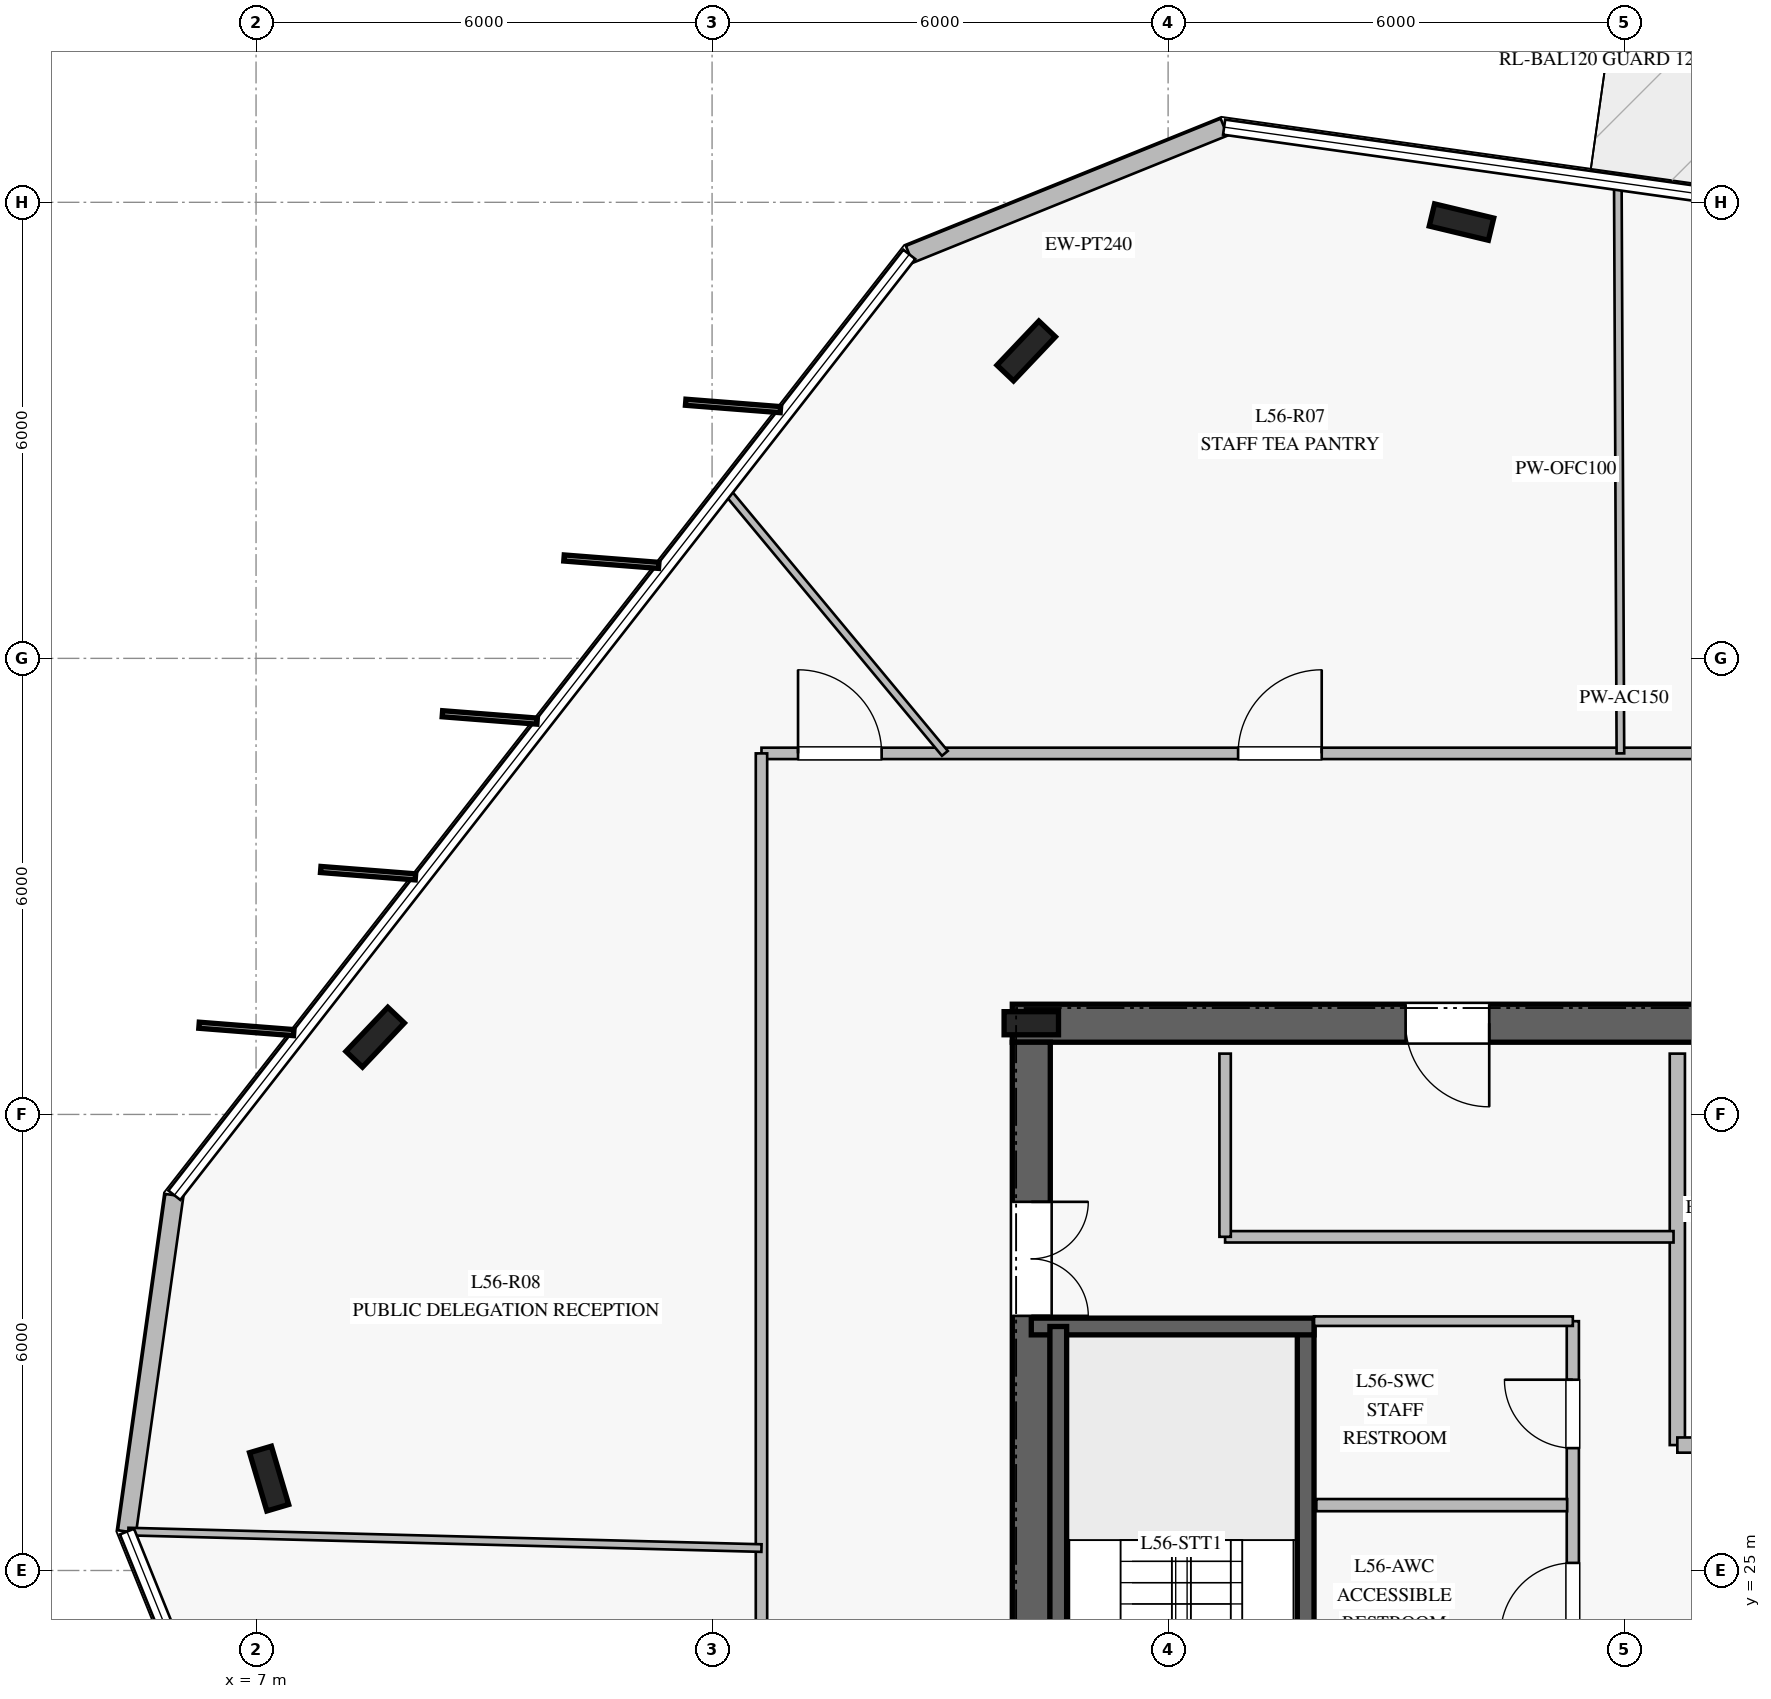
"""IFC4 building model, lengths in metres.
Left out: names, types, materials, properties, quantities, classifications, styles, units other than length and angle.
Written with IfcOpenShell. Run it as: python <this file> out.ifc"""

import sys

from ifc_helpers import new_model, si_unit, direction, frame, frame_2d, origin, origin_2d, place, context, subcontext, project, spatial, rectangle, i_section, extrude, element, fill, save


model = new_model("IFC4")
c1 = context("Model", 3, precision=1e-05, world=origin(), true_north=direction((0.0, 1.0)))
c2 = subcontext(c1, "Body", "Model", "MODEL_VIEW")
j1 = project(units=[si_unit("LENGTHUNIT", "METRE"), si_unit("PLANEANGLEUNIT", "RADIAN")], contexts=[c1])
p1 = place(None, origin())
s1 = spatial("IfcSite", under=j1, at=p1, CompositionType="ELEMENT")
p2 = place(p1, origin())
s2 = spatial("IfcBuilding", under=s1, at=p2, CompositionType="ELEMENT")
p3 = place(p2, frame((0.0, 0.0, 232.8)))
s3 = spatial("IfcBuildingStorey", under=s2, at=p3, CompositionType="ELEMENT", Elevation=232.8)
p4 = place(p3, frame((33.05, 32.2, 0.0), z_axis=(0.0, 0.0, 1.0), x_axis=(-1.0, 0.0, 0.0)))
e1 = element("IfcWall", 1, at=p4, inside=s3, PredefinedType="SHEAR", context=c2, shape_type="SweptSolid", body=[
    extrude(rectangle(XDim=16.1, YDim=0.5, at=frame_2d((8.05, 0.0))), origin(), (0.0, 0.0, 1.0), 3.78),
])
p5 = place(p4, frame((5.0, 0.0, 0.0)))
e2 = element("IfcOpeningElement", 2, at=p5, cuts=e1, PredefinedType="OPENING", context=c2, shape_type="SweptSolid", body=[
    extrude(rectangle(XDim=1.2, YDim=2.25, at=frame_2d((0.6, 1.125))), frame((0.0, 0.26, 0.0), z_axis=(0.0, -1.0, 0.0), x_axis=(1.0, 0.0, 0.0)), (0.0, 0.0, 1.0), 0.52),
])
p6 = place(p4, frame((9.825, 0.0, 0.0)))
e3 = element("IfcOpeningElement", 3, at=p6, cuts=e1, PredefinedType="OPENING", context=c2, shape_type="SweptSolid", body=[
    extrude(rectangle(XDim=1.1, YDim=2.2, at=frame_2d((0.55, 1.1))), frame((0.0, 0.26, 0.0), z_axis=(0.0, -1.0, 0.0), x_axis=(1.0, 0.0, 0.0)), (0.0, 0.0, 1.0), 0.52),
])
p7 = place(p3, frame((17.2, 31.95, 0.0), z_axis=(0.0, 0.0, 1.0), x_axis=(0.0, -1.0, 0.0)))
e4 = element("IfcWall", 4, at=p7, inside=s3, PredefinedType="SHEAR", context=c2, shape_type="SweptSolid", body=[
    extrude(rectangle(XDim=13.9, YDim=0.5, at=frame_2d((6.95, 0.0))), origin(), (0.0, 0.0, 1.0), 3.78),
])
p8 = place(p7, frame((2.1, 0.0, 0.0)))
e5 = element("IfcOpeningElement", 5, at=p8, cuts=e4, PredefinedType="OPENING", context=c2, shape_type="SweptSolid", body=[
    extrude(rectangle(XDim=1.5, YDim=2.2, at=frame_2d((0.75, 1.1))), frame((0.0, 0.26, 0.0), z_axis=(0.0, -1.0, 0.0), x_axis=(1.0, 0.0, 0.0)), (0.0, 0.0, 1.0), 0.52),
])
p9 = place(p3, frame((17.2, 32.2, 0.0), z_axis=(0.0, 0.0, 1.0), x_axis=(1.0, 0.0, 0.0)))
e6 = element("IfcColumn", 6, at=p9, inside=s3, PredefinedType="COLUMN", context=c2, shape_type="SweptSolid", body=[
    extrude(i_section(OverallWidth=0.304, OverallDepth=0.716, WebThickness=0.021, FlangeThickness=0.04, at=origin_2d()), origin(), (0.0, 0.0, 1.0), 4.0),
])
p10 = place(p3, frame((20.81, 20.99, 0.0), z_axis=(0.0, 0.0, 1.0), x_axis=(0.0, 1.0, 0.0)))
e7 = element("IfcWall", 7, at=p10, inside=s3, PredefinedType="SOLIDWALL", context=c2, shape_type="SweptSolid", body=[
    extrude(rectangle(XDim=7.22, YDim=0.22, at=frame_2d((3.61, 0.0))), origin(), (0.0, 0.0, 1.0), 3.78),
])
p11 = place(p10, frame((0.18, 0.0, 0.0)))
e8 = element("IfcOpeningElement", 8, at=p11, cuts=e7, PredefinedType="OPENING", context=c2, shape_type="SweptSolid", body=[
    extrude(rectangle(XDim=1.15, YDim=2.2, at=frame_2d((0.575, 1.1))), frame((0.0, 0.12, 0.0), z_axis=(0.0, -1.0, 0.0), x_axis=(1.0, 0.0, 0.0)), (0.0, 0.0, 1.0), 0.24),
])
p12 = place(p3, frame((17.2, 28.21, 0.0), z_axis=(0.0, 0.0, 1.0), x_axis=(1.0, 0.0, 0.0)))
e9 = element("IfcWall", 9, at=p12, inside=s3, PredefinedType="SOLIDWALL", context=c2, shape_type="SweptSolid", body=[
    extrude(rectangle(XDim=3.72, YDim=0.22, at=frame_2d((1.86, 0.0))), origin(), (0.0, 0.0, 1.0), 3.78),
])
p13 = place(p3, frame((17.555, 28.21, 0.0), z_axis=(0.0, 0.0, 1.0), x_axis=(0.0, -1.0, 0.0)))
e10 = element("IfcWall", 10, at=p13, inside=s3, PredefinedType="SOLIDWALL", context=c2, shape_type="SweptSolid", body=[
    extrude(rectangle(XDim=7.22, YDim=0.22, at=frame_2d((3.61, 0.0))), origin(), (0.0, 0.0, 1.0), 3.78),
])
for number, where, z_axis, x_axis in (
    (11, (22.86, 42.74, 0.0), (0.0, 0.0, 1.0), (-0.972, 0.233, 0.0)),
    (12, (17.133, 41.044, 0.0), (0.0, 0.0, 1.0), (0.688, 0.725, 0.0)),
    (13, (8.567, 32.016, 0.0), (0.0, 0.0, 1.0), (0.688, 0.725, 0.0)),
    (14, (7.172, 26.209, 0.0), (0.0, 0.0, 1.0), (-0.284, 0.959, 0.0)),
):
    element("IfcColumn", number, at=place(p3, frame(where, z_axis=z_axis, x_axis=x_axis)), inside=s3, PredefinedType="COLUMN", context=c2, shape_type="SweptSolid", body=[
        extrude(i_section(OverallWidth=0.3, OverallDepth=0.8, WebThickness=0.018, FlangeThickness=0.033, at=origin_2d()), origin(), (0.0, 0.0, 1.0), 4.0),
    ])
p14 = place(p3, frame((19.737, 43.989, 0.0), z_axis=(0.0, 0.0, 1.0), x_axis=(-0.927140363033, -0.374714220754, 0.0)))
e15 = element("IfcWall", 15, at=p14, inside=s3, PredefinedType="STANDARD", context=c2, shape_type="SweptSolid", body=[
    extrude(rectangle(XDim=4.468, YDim=0.24, at=frame_2d((2.234, 0.0))), origin(), (0.0, 0.0, 1.0), 3.78),
])
p15 = place(p3, frame((5.925, 29.937, 0.0), z_axis=(0.0, 0.0, 1.0), x_axis=(-0.139424759628, -0.990232667812, 0.0)))
e16 = element("IfcWall", 16, at=p15, inside=s3, PredefinedType="STANDARD", context=c2, shape_type="SweptSolid", body=[
    extrude(rectangle(XDim=4.469, YDim=0.24, at=frame_2d((2.234, 0.0))), origin(), (0.0, 0.0, 1.0), 3.78),
])
p16 = place(p3, frame((25.7, 26.65, 0.0), z_axis=(0.0, 0.0, 1.0), x_axis=(0.0, 1.0, 0.0)))
e17 = element("IfcWall", 17, at=p16, inside=s3, PredefinedType="PARTITIONING", context=c2, shape_type="SweptSolid", body=[
    extrude(rectangle(XDim=5.15, YDim=0.2, at=frame_2d((2.575, 0.0))), origin(), (0.0, 0.0, 1.0), 3.78),
])
p17 = place(p3, frame((25.7, 26.65, 0.0), z_axis=(0.0, 0.0, 1.0), x_axis=(1.0, 0.0, 0.0)))
e18 = element("IfcWall", 18, at=p17, inside=s3, PredefinedType="PARTITIONING", context=c2, shape_type="SweptSolid", body=[
    extrude(rectangle(XDim=3.38, YDim=0.2, at=frame_2d((1.69, 0.0))), origin(), (0.0, 0.0, 1.0), 3.78),
])
p18 = place(p3, frame((24.325, 23.35, 0.0), z_axis=(0.0, 0.0, 1.0), x_axis=(0.0, 1.0, 0.0)))
e19 = element("IfcWall", 19, at=p18, inside=s3, PredefinedType="PLUMBINGWALL", context=c2, shape_type="SweptSolid", body=[
    extrude(rectangle(XDim=4.93, YDim=0.16, at=frame_2d((2.465, 0.0))), origin(), (0.0, 0.0, 1.0), 3.78),
])
p19 = place(p18, frame((0.8, 0.0, 0.0)))
e20 = element("IfcOpeningElement", 20, at=p19, cuts=e19, PredefinedType="OPENING", context=c2, shape_type="SweptSolid", body=[
    extrude(rectangle(XDim=0.95, YDim=2.1, at=frame_2d((0.475, 1.05))), frame((0.0, 0.09, 0.0), z_axis=(0.0, -1.0, 0.0), x_axis=(1.0, 0.0, 0.0)), (0.0, 0.0, 1.0), 0.18),
])
p20 = place(p18, frame((3.26, 0.0, 0.0)))
e21 = element("IfcOpeningElement", 21, at=p20, cuts=e19, PredefinedType="OPENING", context=c2, shape_type="SweptSolid", body=[
    extrude(rectangle(XDim=0.9, YDim=2.1, at=frame_2d((0.45, 1.05))), frame((0.0, 0.09, 0.0), z_axis=(0.0, -1.0, 0.0), x_axis=(1.0, 0.0, 0.0)), (0.0, 0.0, 1.0), 0.18),
])
p21 = place(p3, frame((20.92, 28.28, 0.0), z_axis=(0.0, 0.0, 1.0), x_axis=(1.0, 0.0, 0.0)))
e22 = element("IfcWall", 22, at=p21, inside=s3, PredefinedType="PARTITIONING", context=c2, shape_type="SweptSolid", body=[
    extrude(rectangle(XDim=3.405, YDim=0.125, at=frame_2d((1.703, 0.0))), origin(), (0.0, 0.0, 1.0), 3.78),
])
p22 = place(p3, frame((20.95, 25.86, 0.0), z_axis=(0.0, 0.0, 1.0), x_axis=(1.0, 0.0, 0.0)))
e23 = element("IfcWall", 23, at=p22, inside=s3, PredefinedType="PLUMBINGWALL", context=c2, shape_type="SweptSolid", body=[
    extrude(rectangle(XDim=3.3, YDim=0.16, at=frame_2d((1.65, 0.0))), origin(), (0.0, 0.0, 1.0), 3.78),
])
p23 = place(p3, frame((19.75, 29.39, 0.0), z_axis=(0.0, 0.0, 1.0), x_axis=(1.0, 0.0, 0.0)))
e24 = element("IfcWall", 24, at=p23, inside=s3, PredefinedType="PARTITIONING", context=c2, shape_type="SweptSolid", body=[
    extrude(rectangle(XDim=5.9, YDim=0.15, at=frame_2d((2.95, 0.0))), origin(), (0.0, 0.0, 1.0), 3.78),
])
p24 = place(p3, frame((19.75, 29.39, 0.0), z_axis=(0.0, 0.0, 1.0), x_axis=(0.0, 1.0, 0.0)))
e25 = element("IfcWall", 25, at=p24, inside=s3, PredefinedType="PARTITIONING", context=c2, shape_type="SweptSolid", body=[
    extrude(rectangle(XDim=2.41, YDim=0.15, at=frame_2d((1.205, 0.0))), origin(), (0.0, 0.0, 1.0), 3.78),
])
p25 = place(p3, frame((13.65, 35.75, 0.0), z_axis=(0.0, 0.0, 1.0), x_axis=(1.0, 0.0, 0.0)))
e26 = element("IfcWall", 26, at=p25, inside=s3, PredefinedType="PARTITIONING", context=c2, shape_type="SweptSolid", body=[
    extrude(rectangle(XDim=22.7, YDim=0.15, at=frame_2d((11.35, 0.0))), origin(), (0.0, 0.0, 1.0), 3.05),
])
p26 = place(p25, frame((16.267, 0.0, 0.0)))
e27 = element("IfcOpeningElement", 27, at=p26, cuts=e26, PredefinedType="OPENING", context=c2, shape_type="SweptSolid", body=[
    extrude(rectangle(XDim=1.1, YDim=2.2, at=frame_2d((0.55, 1.1))), frame((0.0, 0.085, 0.0), z_axis=(0.0, -1.0, 0.0), x_axis=(1.0, 0.0, 0.0)), (0.0, 0.0, 1.0), 0.17),
])
p27 = place(p25, frame((6.271, 0.0, 0.0)))
e28 = element("IfcOpeningElement", 28, at=p27, cuts=e26, PredefinedType="OPENING", context=c2, shape_type="SweptSolid", body=[
    extrude(rectangle(XDim=1.1, YDim=2.2, at=frame_2d((0.55, 1.1))), frame((0.0, 0.085, 0.0), z_axis=(0.0, -1.0, 0.0), x_axis=(1.0, 0.0, 0.0)), (0.0, 0.0, 1.0), 0.17),
])
p28 = place(p25, frame((0.481, 0.0, 0.0)))
e29 = element("IfcOpeningElement", 29, at=p28, cuts=e26, PredefinedType="OPENING", context=c2, shape_type="SweptSolid", body=[
    extrude(rectangle(XDim=1.1, YDim=2.2, at=frame_2d((0.55, 1.1))), frame((0.0, 0.085, 0.0), z_axis=(0.0, -1.0, 0.0), x_axis=(1.0, 0.0, 0.0)), (0.0, 0.0, 1.0), 0.17),
])
p29 = place(p3, frame((13.65, 14.25, 0.0), z_axis=(0.0, 0.0, 1.0), x_axis=(0.0, 1.0, 0.0)))
e30 = element("IfcWall", 30, at=p29, inside=s3, PredefinedType="PARTITIONING", context=c2, shape_type="SweptSolid", body=[
    extrude(rectangle(XDim=21.5, YDim=0.15, at=frame_2d((10.75, 0.0))), origin(), (0.0, 0.0, 1.0), 3.05),
])
p30 = place(p29, frame((5.157, 0.0, 0.0)))
e31 = element("IfcOpeningElement", 31, at=p30, cuts=e30, PredefinedType="OPENING", context=c2, shape_type="SweptSolid", body=[
    extrude(rectangle(XDim=1.1, YDim=2.2, at=frame_2d((0.55, 1.1))), frame((0.0, 0.085, 0.0), z_axis=(0.0, -1.0, 0.0), x_axis=(1.0, 0.0, 0.0)), (0.0, 0.0, 1.0), 0.17),
])
p31 = place(p3, frame((24.951, 35.75, 0.0), z_axis=(0.0, 0.0, 1.0), x_axis=(-0.004528378394, 0.999989746842, 0.0)))
e32 = element("IfcWall", 32, at=p31, inside=s3, PredefinedType="MOVABLE", context=c2, shape_type="SweptSolid", body=[
    extrude(rectangle(XDim=7.494, YDim=0.1, at=frame_2d((3.747, 0.0))), origin(), (0.0, 0.0, 1.0), 3.18),
])
p32 = place(p3, frame((16.063, 35.75, 0.0), z_axis=(0.0, 0.0, 1.0), x_axis=(-0.639415003437, 0.768861790818, 0.0)))
e33 = element("IfcWall", 33, at=p32, inside=s3, PredefinedType="MOVABLE", context=c2, shape_type="SweptSolid", body=[
    extrude(rectangle(XDim=4.496, YDim=0.1, at=frame_2d((2.248, 0.0))), origin(), (0.0, 0.0, 1.0), 3.18),
])
p33 = place(p3, frame((13.65, 25.295, 0.0), z_axis=(0.0, 0.0, 1.0), x_axis=(-0.99966071874, 0.026047023036, 0.0)))
e34 = element("IfcWall", 34, at=p33, inside=s3, PredefinedType="MOVABLE", context=c2, shape_type="SweptSolid", body=[
    extrude(rectangle(XDim=8.333, YDim=0.1, at=frame_2d((4.167, 0.0))), origin(), (0.0, 0.0, 1.0), 3.18),
])
p34 = place(p8, origin())
e35 = element("IfcDoor", 35, at=p34, inside=s3, OperationType="DOUBLE_DOOR_SINGLE_SWING", PredefinedType="DOOR", context=c2, shape_type="SweptSolid", body=[
    extrude(rectangle(XDim=1.5, YDim=2.2, at=frame_2d((0.75, 1.1))), frame((0.0, 0.025, 0.0), z_axis=(0.0, -1.0, 0.0), x_axis=(1.0, 0.0, 0.0)), (0.0, 0.0, 1.0), 0.05),
])
fill(e5, e35)
p35 = place(p19, origin())
e36 = element("IfcDoor", 36, at=p35, inside=s3, OperationType="SINGLE_SWING_LEFT", PredefinedType="DOOR", context=c2, shape_type="SweptSolid", body=[
    extrude(rectangle(XDim=0.95, YDim=2.1, at=frame_2d((0.475, 1.05))), frame((0.0, 0.025, 0.0), z_axis=(0.0, -1.0, 0.0), x_axis=(1.0, 0.0, 0.0)), (0.0, 0.0, 1.0), 0.05),
])
fill(e20, e36)
p36 = place(p20, origin())
e37 = element("IfcDoor", 37, at=p36, inside=s3, OperationType="SINGLE_SWING_RIGHT", PredefinedType="DOOR", context=c2, shape_type="SweptSolid", body=[
    extrude(rectangle(XDim=0.9, YDim=2.1, at=frame_2d((0.45, 1.05))), frame((0.0, 0.025, 0.0), z_axis=(0.0, -1.0, 0.0), x_axis=(1.0, 0.0, 0.0)), (0.0, 0.0, 1.0), 0.05),
])
fill(e21, e37)
p37 = place(p6, origin())
e38 = element("IfcDoor", 38, at=p37, inside=s3, OperationType="SINGLE_SWING_LEFT", PredefinedType="DOOR", context=c2, shape_type="SweptSolid", body=[
    extrude(rectangle(XDim=1.1, YDim=2.2, at=frame_2d((0.55, 1.1))), frame((0.0, 0.025, 0.0), z_axis=(0.0, -1.0, 0.0), x_axis=(1.0, 0.0, 0.0)), (0.0, 0.0, 1.0), 0.05),
])
fill(e3, e38)
p38 = place(p27, origin())
e39 = element("IfcDoor", 39, at=p38, inside=s3, OperationType="SINGLE_SWING_RIGHT", PredefinedType="DOOR", context=c2, shape_type="SweptSolid", body=[
    extrude(rectangle(XDim=1.1, YDim=2.2, at=frame_2d((0.55, 1.1))), frame((0.0, 0.025, 0.0), z_axis=(0.0, -1.0, 0.0), x_axis=(1.0, 0.0, 0.0)), (0.0, 0.0, 1.0), 0.05),
])
fill(e28, e39)
p39 = place(p28, origin())
e40 = element("IfcDoor", 40, at=p39, inside=s3, OperationType="SINGLE_SWING_LEFT", PredefinedType="DOOR", context=c2, shape_type="SweptSolid", body=[
    extrude(rectangle(XDim=1.1, YDim=2.2, at=frame_2d((0.55, 1.1))), frame((0.0, 0.025, 0.0), z_axis=(0.0, -1.0, 0.0), x_axis=(1.0, 0.0, 0.0)), (0.0, 0.0, 1.0), 0.05),
])
fill(e29, e40)
save(model, sys.argv[1])
